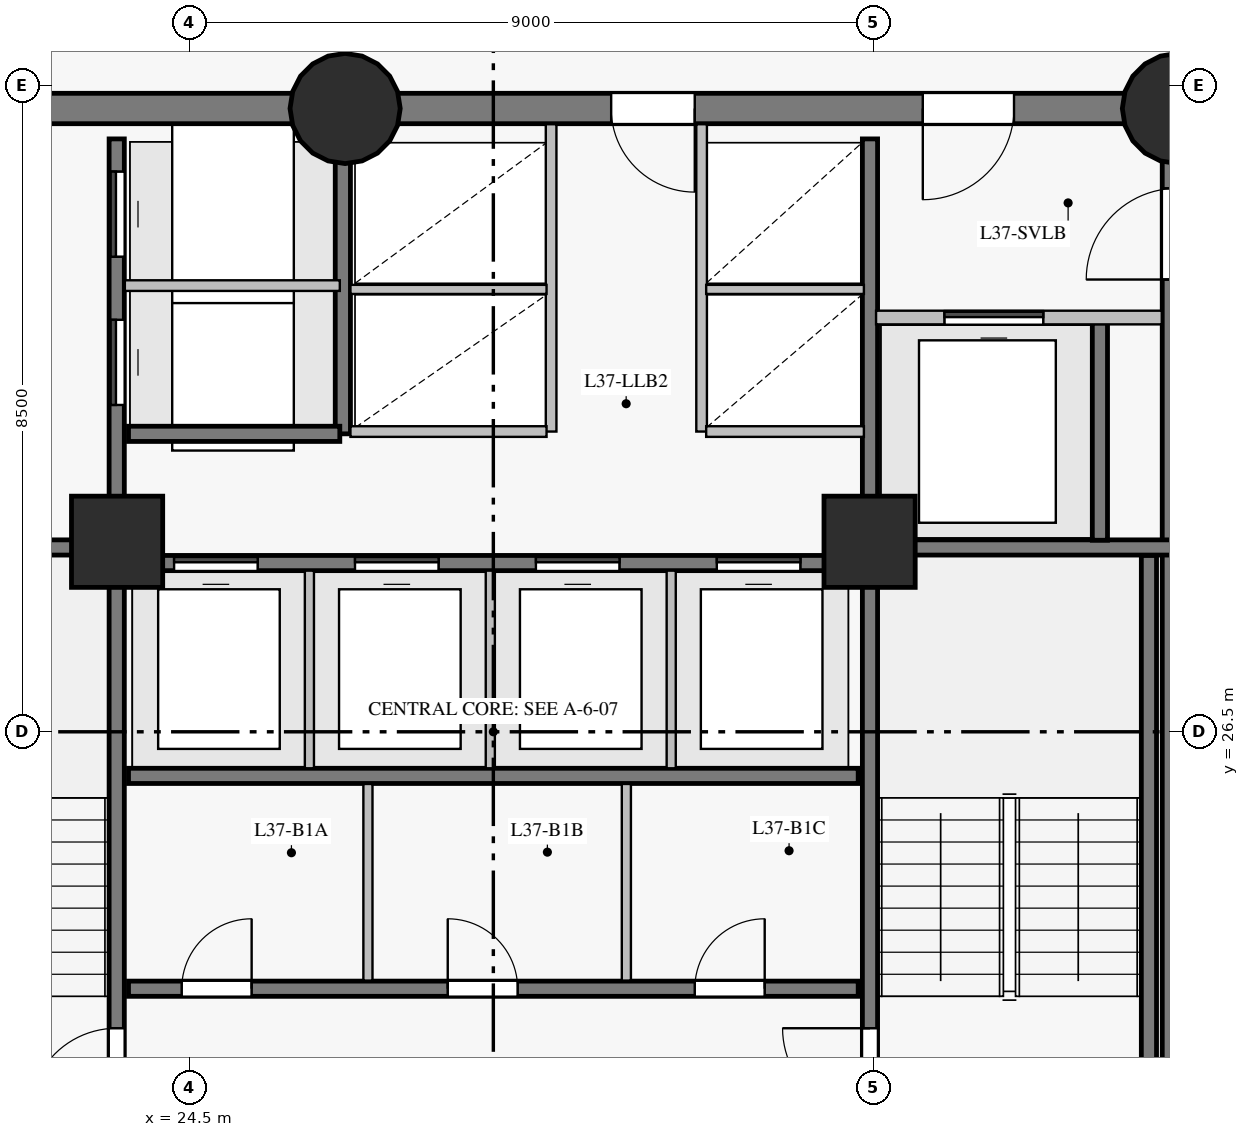
"""IFC4 building model, lengths in metres.
Left out: names, types, materials, properties, quantities, classifications, styles, units other than length and angle.
Written with IfcOpenShell. Run it as: python <this file> out.ifc"""

import sys

from ifc_helpers import new_model, si_unit, direction, frame, frame_2d, origin, origin_with_axes, origin_2d, place, context, subcontext, project, spatial, rectangle, circle, extrude, source, transform, mapped, element, fill, save


model = new_model("IFC4")
c1 = context("Model", 3, precision=1e-05, world=origin(), true_north=direction((0.0, 1.0)))
c2 = subcontext(c1, "Body", "Model", "MODEL_VIEW")
j1 = project(units=[si_unit("LENGTHUNIT", "METRE"), si_unit("PLANEANGLEUNIT", "RADIAN")], contexts=[c1])
p1 = place(None, origin())
s1 = spatial("IfcSite", under=j1, at=p1, CompositionType="ELEMENT")
p2 = place(p1, origin())
s2 = spatial("IfcBuilding", under=s1, at=p2, CompositionType="ELEMENT")
p3 = place(p2, frame((0.0, 0.0, 132.8)))
s3 = spatial("IfcBuildingStorey", under=s2, at=p3, CompositionType="ELEMENT", Elevation=132.8)
p4 = place(p3, frame((37.5, 18.3, 0.0), z_axis=(0.0, 0.0, 1.0), x_axis=(0.0, 1.0, 0.0)))
e1 = element("IfcWall", 1, at=p4, inside=s3, PredefinedType="SHEAR", context=c2, shape_type="SweptSolid", body=[
    extrude(rectangle(XDim=16.4, YDim=0.4, at=frame_2d((8.2, 0.0))), origin(), (0.0, 0.0, 1.0), 2.825),
])
p5 = place(p4, frame((14.15, 0.0, 0.0)))
e2 = element("IfcOpeningElement", 2, at=p5, cuts=e1, PredefinedType="OPENING", context=c2, shape_type="SweptSolid", body=[
    extrude(rectangle(XDim=1.2, YDim=2.15, at=frame_2d((0.6, 1.075))), frame((0.0, 0.21, 0.0), z_axis=(0.0, -1.0, 0.0), x_axis=(1.0, 0.0, 0.0)), (0.0, 0.0, 1.0), 0.42),
])
p6 = place(p3, frame((37.5, 34.7, 0.0), z_axis=(0.0, 0.0, 1.0), x_axis=(-1.0, 0.0, 0.0)))
e3 = element("IfcWall", 3, at=p6, inside=s3, PredefinedType="SHEAR", context=c2, shape_type="SweptSolid", body=[
    extrude(rectangle(XDim=10.95, YDim=0.4, at=frame_2d((5.475, 0.0))), origin(), (0.0, 0.0, 1.0), 2.825),
])
p7 = place(p6, frame((2.15, 0.0, 0.0)))
e4 = element("IfcOpeningElement", 4, at=p7, cuts=e3, PredefinedType="OPENING", context=c2, shape_type="SweptSolid", body=[
    extrude(rectangle(XDim=1.2, YDim=2.15, at=frame_2d((0.6, 1.075))), frame((0.0, 0.21, 0.0), z_axis=(0.0, -1.0, 0.0), x_axis=(1.0, 0.0, 0.0)), (0.0, 0.0, 1.0), 0.42),
])
p8 = place(p6, frame((6.35, 0.0, 0.0)))
e5 = element("IfcOpeningElement", 5, at=p8, cuts=e3, PredefinedType="OPENING", context=c2, shape_type="SweptSolid", body=[
    extrude(rectangle(XDim=1.1, YDim=2.15, at=frame_2d((0.55, 1.075))), frame((0.0, 0.21, 0.0), z_axis=(0.0, -1.0, 0.0), x_axis=(1.0, 0.0, 0.0)), (0.0, 0.0, 1.0), 0.42),
])
p9 = place(p3, frame((26.55, 34.7, 0.0), z_axis=(0.0, 0.0, 1.0), x_axis=(-1.0, 0.0, 0.0)))
e6 = element("IfcWall", 6, at=p9, inside=s3, PredefinedType="SHEAR", context=c2, shape_type="SweptSolid", body=[
    extrude(rectangle(XDim=7.05, YDim=0.4, at=frame_2d((3.525, 0.0))), origin(), (0.0, 0.0, 1.0), 2.825),
])
p10 = place(p9, frame((4.25, 0.0, 0.0)))
e7 = element("IfcOpeningElement", 7, at=p10, cuts=e6, PredefinedType="OPENING", context=c2, shape_type="SweptSolid", body=[
    extrude(rectangle(XDim=1.1, YDim=2.15, at=frame_2d((0.55, 1.075))), frame((0.0, 0.21, 0.0), z_axis=(0.0, -1.0, 0.0), x_axis=(1.0, 0.0, 0.0)), (0.0, 0.0, 1.0), 0.42),
])
m1 = source(origin_with_axes(), c2, "Body", "SweptSolid", [
    extrude(circle(Radius=0.725, at=origin_2d()), origin(), (0.0, 0.0, 1.0), 3.05),
])
for number, where, z_axis, x_axis in (
    (8, (26.55, 34.7, 0.0), (0.0, 0.0, 1.0), (1.0, 0.0, 0.0)),
    (9, (37.5, 34.7, 0.0), (0.0, 0.0, 1.0), (1.0, 0.0, 0.0)),
):
    element("IfcColumn", number, at=place(p3, frame(where, z_axis=z_axis, x_axis=x_axis)), inside=s3, PredefinedType="COLUMN", context=c2, shape_type="MappedRepresentation", body=[
        mapped(m1, transform((0.0, 0.0, 0.0), scale=1.0)),
    ])
m2 = source(origin_with_axes(), c2, "Body", "SweptSolid", [
    extrude(rectangle(XDim=1.2, YDim=1.2, at=origin_2d()), origin(), (0.0, 0.0, 1.0), 3.05),
])
for number, where, z_axis, x_axis in (
    (10, (23.55, 29.0, 0.0), (0.0, 0.0, 1.0), (1.0, 0.0, 0.0)),
    (11, (33.45, 29.0, 0.0), (0.0, 0.0, 1.0), (1.0, 0.0, 0.0)),
):
    element("IfcColumn", number, at=place(p3, frame(where, z_axis=z_axis, x_axis=x_axis)), inside=s3, PredefinedType="COLUMN", context=c2, shape_type="MappedRepresentation", body=[
        mapped(m2, transform((0.0, 0.0, 0.0), scale=1.0)),
    ])
p11 = place(p3, frame((23.545, 18.7, 0.0), z_axis=(0.0, 0.0, 1.0), x_axis=(0.0, 1.0, 0.0)))
e12 = element("IfcWall", 12, at=p11, inside=s3, PredefinedType="SHEAR", context=c2, shape_type="SweptSolid", body=[
    extrude(rectangle(XDim=15.6, YDim=0.2, at=frame_2d((7.8, 0.0))), origin(), (0.0, 0.0, 1.0), 2.825),
])
p12 = place(p11, frame((2.75, 0.0, 0.0)))
e13 = element("IfcOpeningElement", 13, at=p12, cuts=e12, PredefinedType="OPENING", context=c2, shape_type="SweptSolid", body=[
    extrude(rectangle(XDim=1.15, YDim=2.15, at=frame_2d((0.575, 1.075))), frame((0.0, 0.11, 0.0), z_axis=(0.0, -1.0, 0.0), x_axis=(1.0, 0.0, 0.0)), (0.0, 0.0, 1.0), 0.22),
])
p13 = place(p11, frame((0.14, 0.0, 0.0)))
e14 = element("IfcOpeningElement", 14, at=p13, cuts=e12, PredefinedType="OPENING", context=c2, shape_type="SweptSolid", body=[
    extrude(rectangle(XDim=0.88, YDim=2.1, at=frame_2d((0.44, 1.05))), frame((0.0, 0.11, 0.0), z_axis=(0.0, -1.0, 0.0), x_axis=(1.0, 0.0, 0.0)), (0.0, 0.0, 1.0), 0.22),
])
p14 = place(p11, frame((1.36, 0.0, 0.0)))
e15 = element("IfcOpeningElement", 15, at=p14, cuts=e12, PredefinedType="OPENING", context=c2, shape_type="SweptSolid", body=[
    extrude(rectangle(XDim=0.88, YDim=2.1, at=frame_2d((0.44, 1.05))), frame((0.0, 0.11, 0.0), z_axis=(0.0, -1.0, 0.0), x_axis=(1.0, 0.0, 0.0)), (0.0, 0.0, 1.0), 0.22),
])
p15 = place(p11, frame((12.1, 0.0, 0.0)))
e16 = element("IfcOpeningElement", 16, at=p15, cuts=e12, PredefinedType="OPENING", context=c2, shape_type="SweptSolid", body=[
    extrude(rectangle(XDim=1.12, YDim=2.15, at=frame_2d((0.56, 1.075))), frame((0.0, 0.11, 0.0), z_axis=(0.0, -1.0, 0.0), x_axis=(1.0, 0.0, 0.0)), (0.0, 0.0, 1.0), 0.22),
])
p16 = place(p11, frame((14.05, 0.0, 0.0)))
e17 = element("IfcOpeningElement", 17, at=p16, cuts=e12, PredefinedType="OPENING", context=c2, shape_type="SweptSolid", body=[
    extrude(rectangle(XDim=1.12, YDim=2.15, at=frame_2d((0.56, 1.075))), frame((0.0, 0.11, 0.0), z_axis=(0.0, -1.0, 0.0), x_axis=(1.0, 0.0, 0.0)), (0.0, 0.0, 1.0), 0.22),
])
p17 = place(p3, frame((33.455, 18.7, 0.0), z_axis=(0.0, 0.0, 1.0), x_axis=(0.0, 1.0, 0.0)))
e18 = element("IfcWall", 18, at=p17, inside=s3, PredefinedType="SHEAR", context=c2, shape_type="SweptSolid", body=[
    extrude(rectangle(XDim=15.6, YDim=0.2, at=frame_2d((7.8, 0.0))), origin(), (0.0, 0.0, 1.0), 2.825),
])
p18 = place(p17, frame((2.75, 0.0, 0.0)))
e19 = element("IfcOpeningElement", 19, at=p18, cuts=e18, PredefinedType="OPENING", context=c2, shape_type="SweptSolid", body=[
    extrude(rectangle(XDim=1.15, YDim=2.15, at=frame_2d((0.575, 1.075))), frame((0.0, 0.11, 0.0), z_axis=(0.0, -1.0, 0.0), x_axis=(1.0, 0.0, 0.0)), (0.0, 0.0, 1.0), 0.22),
])
p19 = place(p17, frame((0.55, 0.0, 0.0)))
e20 = element("IfcOpeningElement", 20, at=p19, cuts=e18, PredefinedType="OPENING", context=c2, shape_type="SweptSolid", body=[
    extrude(rectangle(XDim=0.94, YDim=2.1, at=frame_2d((0.47, 1.05))), frame((0.0, 0.11, 0.0), z_axis=(0.0, -1.0, 0.0), x_axis=(1.0, 0.0, 0.0)), (0.0, 0.0, 1.0), 0.22),
])
p20 = place(p3, frame((23.7, 23.12, 0.0), z_axis=(0.0, 0.0, 1.0), x_axis=(1.0, 0.0, 0.0)))
e21 = element("IfcWall", 21, at=p20, inside=s3, PredefinedType="SHEAR", context=c2, shape_type="SweptSolid", body=[
    extrude(rectangle(XDim=9.6, YDim=0.2, at=frame_2d((4.8, 0.0))), origin(), (0.0, 0.0, 1.0), 2.825),
])
p21 = place(p20, frame((0.7, 0.0, 0.0)))
e22 = element("IfcOpeningElement", 22, at=p21, cuts=e21, PredefinedType="OPENING", context=c2, shape_type="SweptSolid", body=[
    extrude(rectangle(XDim=0.92, YDim=2.1, at=frame_2d((0.46, 1.05))), frame((0.0, 0.11, 0.0), z_axis=(0.0, -1.0, 0.0), x_axis=(1.0, 0.0, 0.0)), (0.0, 0.0, 1.0), 0.22),
])
p22 = place(p20, frame((4.2, 0.0, 0.0)))
e23 = element("IfcOpeningElement", 23, at=p22, cuts=e21, PredefinedType="OPENING", context=c2, shape_type="SweptSolid", body=[
    extrude(rectangle(XDim=0.92, YDim=2.1, at=frame_2d((0.46, 1.05))), frame((0.0, 0.11, 0.0), z_axis=(0.0, -1.0, 0.0), x_axis=(1.0, 0.0, 0.0)), (0.0, 0.0, 1.0), 0.22),
])
p23 = place(p20, frame((7.45, 0.0, 0.0)))
e24 = element("IfcOpeningElement", 24, at=p23, cuts=e21, PredefinedType="OPENING", context=c2, shape_type="SweptSolid", body=[
    extrude(rectangle(XDim=0.92, YDim=2.1, at=frame_2d((0.46, 1.05))), frame((0.0, 0.11, 0.0), z_axis=(0.0, -1.0, 0.0), x_axis=(1.0, 0.0, 0.0)), (0.0, 0.0, 1.0), 0.22),
])
p24 = place(p3, frame((23.7, 25.92, 0.0), z_axis=(0.0, 0.0, 1.0), x_axis=(1.0, 0.0, 0.0)))
e25 = element("IfcWall", 25, at=p24, inside=s3, PredefinedType="SHEAR", context=c2, shape_type="SweptSolid", body=[
    extrude(rectangle(XDim=9.6, YDim=0.2, at=frame_2d((4.8, 0.0))), origin(), (0.0, 0.0, 1.0), 2.825),
])
p25 = place(p3, frame((23.7, 28.72, 0.0), z_axis=(0.0, 0.0, 1.0), x_axis=(1.0, 0.0, 0.0)))
e26 = element("IfcWall", 26, at=p25, inside=s3, PredefinedType="SHEAR", context=c2, shape_type="SweptSolid", body=[
    extrude(rectangle(XDim=9.6, YDim=0.2, at=frame_2d((4.8, 0.0))), origin(), (0.0, 0.0, 1.0), 2.825),
])
p26 = place(p25, frame((0.6, 0.0, 0.0)))
e27 = element("IfcOpeningElement", 27, at=p26, cuts=e26, PredefinedType="OPENING", context=c2, shape_type="SweptSolid", body=[
    extrude(rectangle(XDim=1.1, YDim=2.15, at=frame_2d((0.55, 1.075))), frame((0.0, 0.11, 0.0), z_axis=(0.0, -1.0, 0.0), x_axis=(1.0, 0.0, 0.0)), (0.0, 0.0, 1.0), 0.22),
])
p27 = place(p25, frame((2.98, 0.0, 0.0)))
e28 = element("IfcOpeningElement", 28, at=p27, cuts=e26, PredefinedType="OPENING", context=c2, shape_type="SweptSolid", body=[
    extrude(rectangle(XDim=1.1, YDim=2.15, at=frame_2d((0.55, 1.075))), frame((0.0, 0.11, 0.0), z_axis=(0.0, -1.0, 0.0), x_axis=(1.0, 0.0, 0.0)), (0.0, 0.0, 1.0), 0.22),
])
p28 = place(p25, frame((5.36, 0.0, 0.0)))
e29 = element("IfcOpeningElement", 29, at=p28, cuts=e26, PredefinedType="OPENING", context=c2, shape_type="SweptSolid", body=[
    extrude(rectangle(XDim=1.1, YDim=2.15, at=frame_2d((0.55, 1.075))), frame((0.0, 0.11, 0.0), z_axis=(0.0, -1.0, 0.0), x_axis=(1.0, 0.0, 0.0)), (0.0, 0.0, 1.0), 0.22),
])
p29 = place(p25, frame((7.74, 0.0, 0.0)))
e30 = element("IfcOpeningElement", 30, at=p29, cuts=e26, PredefinedType="OPENING", context=c2, shape_type="SweptSolid", body=[
    extrude(rectangle(XDim=1.1, YDim=2.15, at=frame_2d((0.55, 1.075))), frame((0.0, 0.11, 0.0), z_axis=(0.0, -1.0, 0.0), x_axis=(1.0, 0.0, 0.0)), (0.0, 0.0, 1.0), 0.22),
])
p30 = place(p3, frame((37.125, 21.32, 0.0), z_axis=(0.0, 0.0, 1.0), x_axis=(0.0, 1.0, 0.0)))
e31 = element("IfcWall", 31, at=p30, inside=s3, PredefinedType="SHEAR", context=c2, shape_type="SweptSolid", body=[
    extrude(rectangle(XDim=7.5, YDim=0.2, at=frame_2d((3.75, 0.0))), origin(), (0.0, 0.0, 1.0), 2.825),
])
for number, where, z_axis, x_axis in (
    (32, (33.455, 28.925, 0.0), (0.0, 0.0, 1.0), (1.0, 0.0, 0.0)),
    (33, (19.55, 28.925, 0.0), (0.0, 0.0, 1.0), (1.0, 0.0, 0.0)),
):
    element("IfcWall", number, at=place(p3, frame(where, z_axis=z_axis, x_axis=x_axis)), inside=s3, PredefinedType="SHEAR", context=c2, shape_type="SweptSolid", body=[
        extrude(rectangle(XDim=3.995, YDim=0.2, at=frame_2d((1.998, 0.0))), origin(), (0.0, 0.0, 1.0), 2.825),
    ])
p31 = place(p3, frame((26.52, 30.42, 0.0), z_axis=(0.0, 0.0, 1.0), x_axis=(0.0, 1.0, 0.0)))
e34 = element("IfcWall", 34, at=p31, inside=s3, PredefinedType="SHEAR", context=c2, shape_type="SweptSolid", body=[
    extrude(rectangle(XDim=3.86, YDim=0.2, at=frame_2d((1.93, 0.0))), origin(), (0.0, 0.0, 1.0), 2.825),
])
p32 = place(p3, frame((36.48, 29.02, 0.0), z_axis=(0.0, 0.0, 1.0), x_axis=(0.0, 1.0, 0.0)))
e35 = element("IfcWall", 35, at=p32, inside=s3, PredefinedType="SHEAR", context=c2, shape_type="SweptSolid", body=[
    extrude(rectangle(XDim=2.86, YDim=0.2, at=frame_2d((1.43, 0.0))), origin(), (0.0, 0.0, 1.0), 2.825),
])
p33 = place(p3, frame((23.7, 30.42, 0.0), z_axis=(0.0, 0.0, 1.0), x_axis=(1.0, 0.0, 0.0)))
e36 = element("IfcWall", 36, at=p33, inside=s3, PredefinedType="SHEAR", context=c2, shape_type="SweptSolid", body=[
    extrude(rectangle(XDim=2.78, YDim=0.2, at=frame_2d((1.39, 0.0))), origin(), (0.0, 0.0, 1.0), 2.825),
])
for number, where, z_axis, x_axis in (
    (37, (29.26, 30.45, 0.0), (0.0, 0.0, 1.0), (0.0, 1.0, 0.0)),
    (38, (31.24, 30.45, 0.0), (0.0, 0.0, 1.0), (0.0, 1.0, 0.0)),
):
    element("IfcWall", number, at=place(p3, frame(where, z_axis=z_axis, x_axis=x_axis)), inside=s3, PredefinedType="PARTITIONING", context=c2, shape_type="SweptSolid", body=[
        extrude(rectangle(XDim=4.043, YDim=0.14, at=frame_2d((2.021, 0.0))), origin(), (0.0, 0.0, 1.0), 2.825),
    ])
p34 = place(p3, frame((33.535, 31.95, 0.0), z_axis=(0.0, 0.0, 1.0), x_axis=(1.0, 0.0, 0.0)))
e39 = element("IfcWall", 39, at=p34, inside=s3, PredefinedType="PARTITIONING", context=c2, shape_type="SweptSolid", body=[
    extrude(rectangle(XDim=3.759, YDim=0.18, at=frame_2d((1.879, 0.0))), origin(), (0.0, 0.0, 1.0), 2.825),
])
p35 = place(p34, frame((0.9, 0.0, 0.0)))
e40 = element("IfcOpeningElement", 40, at=p35, cuts=e39, PredefinedType="OPENING", context=c2, shape_type="SweptSolid", body=[
    extrude(rectangle(XDim=1.3, YDim=2.2, at=frame_2d((0.65, 1.1))), frame((0.0, 0.1, 0.0), z_axis=(0.0, -1.0, 0.0), x_axis=(1.0, 0.0, 0.0)), (0.0, 0.0, 1.0), 0.2),
])
p36 = place(p3, frame((23.652, 32.37, 0.0), z_axis=(0.0, 0.0, 1.0), x_axis=(1.0, 0.0, 0.0)))
e41 = element("IfcWall", 41, at=p36, inside=s3, PredefinedType="PARTITIONING", context=c2, shape_type="SweptSolid", body=[
    extrude(rectangle(XDim=2.828, YDim=0.14, at=frame_2d((1.414, 0.0))), origin(), (0.0, 0.0, 1.0), 2.825),
])
for number, where, z_axis, x_axis in (
    (42, (26.08, 26.02, 0.0), (0.0, 0.0, 1.0), (0.0, 1.0, 0.0)),
    (43, (28.46, 26.02, 0.0), (0.0, 0.0, 1.0), (0.0, 1.0, 0.0)),
    (44, (30.84, 26.02, 0.0), (0.0, 0.0, 1.0), (0.0, 1.0, 0.0)),
):
    element("IfcWall", number, at=place(p3, frame(where, z_axis=z_axis, x_axis=x_axis)), inside=s3, PredefinedType="PARTITIONING", context=c2, shape_type="SweptSolid", body=[
        extrude(rectangle(XDim=2.6, YDim=0.12, at=frame_2d((1.3, 0.0))), origin(), (0.0, 0.0, 1.0), 2.825),
    ])
p37 = place(p3, frame((26.62, 30.45, 0.0), z_axis=(0.0, 0.0, 1.0), x_axis=(1.0, 0.0, 0.0)))
e45 = element("IfcWall", 45, at=p37, inside=s3, PredefinedType="PARTITIONING", context=c2, shape_type="SweptSolid", body=[
    extrude(rectangle(XDim=2.58, YDim=0.14, at=frame_2d((1.29, 0.0))), origin(), (0.0, 0.0, 1.0), 2.825),
])
p38 = place(p3, frame((26.62, 32.32, 0.0), z_axis=(0.0, 0.0, 1.0), x_axis=(1.0, 0.0, 0.0)))
e46 = element("IfcWall", 46, at=p38, inside=s3, PredefinedType="PARTITIONING", context=c2, shape_type="SweptSolid", body=[
    extrude(rectangle(XDim=2.58, YDim=0.12, at=frame_2d((1.29, 0.0))), origin(), (0.0, 0.0, 1.0), 2.825),
])
for number, where, z_axis, x_axis in (
    (47, (26.85, 23.227, 0.0), (0.0, 0.0, 1.0), (0.0, 1.0, 0.0)),
    (48, (30.25, 23.227, 0.0), (0.0, 0.0, 1.0), (0.0, 1.0, 0.0)),
):
    element("IfcWall", number, at=place(p3, frame(where, z_axis=z_axis, x_axis=x_axis)), inside=s3, PredefinedType="PARTITIONING", context=c2, shape_type="SweptSolid", body=[
        extrude(rectangle(XDim=2.587, YDim=0.12, at=frame_2d((1.293, 0.0))), origin(), (0.0, 0.0, 1.0), 2.825),
    ])
p39 = place(p3, frame((31.3, 30.45, 0.0), z_axis=(0.0, 0.0, 1.0), x_axis=(1.0, 0.0, 0.0)))
e49 = element("IfcWall", 49, at=p39, inside=s3, PredefinedType="PARTITIONING", context=c2, shape_type="SweptSolid", body=[
    extrude(rectangle(XDim=2.075, YDim=0.14, at=frame_2d((1.038, 0.0))), origin(), (0.0, 0.0, 1.0), 2.825),
])
p40 = place(p3, frame((31.3, 32.32, 0.0), z_axis=(0.0, 0.0, 1.0), x_axis=(1.0, 0.0, 0.0)))
e50 = element("IfcWall", 50, at=p40, inside=s3, PredefinedType="PARTITIONING", context=c2, shape_type="SweptSolid", body=[
    extrude(rectangle(XDim=2.075, YDim=0.12, at=frame_2d((1.038, 0.0))), origin(), (0.0, 0.0, 1.0), 2.825),
])
m3 = source(origin_with_axes(), c2, "Body", "SweptSolid", [
    extrude(rectangle(XDim=1.15, YDim=2.15, at=frame_2d((0.575, 1.075))), frame((0.0, 0.025, 0.0), z_axis=(0.0, -1.0, 0.0), x_axis=(1.0, 0.0, 0.0)), (0.0, 0.0, 1.0), 0.05),
])
p41 = place(p12, origin())
e51 = element("IfcDoor", 51, at=p41, inside=s3, OperationType="SINGLE_SWING_LEFT", PredefinedType="DOOR", context=c2, shape_type="MappedRepresentation", body=[
    mapped(m3, transform((0.0, 0.0, 0.0), scale=1.0)),
])
fill(e13, e51)
p42 = place(p18, origin())
e52 = element("IfcDoor", 52, at=p42, inside=s3, OperationType="SINGLE_SWING_RIGHT", PredefinedType="DOOR", context=c2, shape_type="MappedRepresentation", body=[
    mapped(m3, transform((0.0, 0.0, 0.0), scale=1.0)),
])
fill(e19, e52)
m4 = source(origin_with_axes(), c2, "Body", "SweptSolid", [
    extrude(rectangle(XDim=1.2, YDim=2.15, at=frame_2d((0.6, 1.075))), frame((0.0, 0.025, 0.0), z_axis=(0.0, -1.0, 0.0), x_axis=(1.0, 0.0, 0.0)), (0.0, 0.0, 1.0), 0.05),
])
p43 = place(p7, origin())
e53 = element("IfcDoor", 53, at=p43, inside=s3, OperationType="SINGLE_SWING_RIGHT", PredefinedType="DOOR", context=c2, shape_type="MappedRepresentation", body=[
    mapped(m4, transform((0.0, 0.0, 0.0), scale=1.0)),
])
fill(e4, e53)
m5 = source(origin_with_axes(), c2, "Body", "SweptSolid", [
    extrude(rectangle(XDim=1.3, YDim=2.2, at=frame_2d((0.65, 1.1))), frame((0.0, 0.025, 0.0), z_axis=(0.0, -1.0, 0.0), x_axis=(1.0, 0.0, 0.0)), (0.0, 0.0, 1.0), 0.05),
])
p44 = place(p35, origin())
e54 = element("IfcDoor", 54, at=p44, inside=s3, OperationType="SLIDING_TO_LEFT", PredefinedType="DOOR", context=c2, shape_type="MappedRepresentation", body=[
    mapped(m5, transform((0.0, 0.0, 0.0), scale=1.0)),
])
fill(e40, e54)
m6 = source(origin_with_axes(), c2, "Body", "SweptSolid", [
    extrude(rectangle(XDim=0.92, YDim=2.1, at=frame_2d((0.46, 1.05))), frame((0.0, 0.025, 0.0), z_axis=(0.0, -1.0, 0.0), x_axis=(1.0, 0.0, 0.0)), (0.0, 0.0, 1.0), 0.05),
])
p45 = place(p21, origin())
e55 = element("IfcDoor", 55, at=p45, inside=s3, OperationType="SINGLE_SWING_RIGHT", PredefinedType="DOOR", context=c2, shape_type="MappedRepresentation", body=[
    mapped(m6, transform((0.0, 0.0, 0.0), scale=1.0)),
])
fill(e22, e55)
p46 = place(p22, origin())
e56 = element("IfcDoor", 56, at=p46, inside=s3, OperationType="SINGLE_SWING_LEFT", PredefinedType="DOOR", context=c2, shape_type="MappedRepresentation", body=[
    mapped(m6, transform((0.0, 0.0, 0.0), scale=1.0)),
])
fill(e23, e56)
p47 = place(p23, origin())
e57 = element("IfcDoor", 57, at=p47, inside=s3, OperationType="SINGLE_SWING_RIGHT", PredefinedType="DOOR", context=c2, shape_type="MappedRepresentation", body=[
    mapped(m6, transform((0.0, 0.0, 0.0), scale=1.0)),
])
fill(e24, e57)
m7 = source(origin_with_axes(), c2, "Body", "SweptSolid", [
    extrude(rectangle(XDim=1.1, YDim=2.15, at=frame_2d((0.55, 1.075))), frame((0.0, 0.025, 0.0), z_axis=(0.0, -1.0, 0.0), x_axis=(1.0, 0.0, 0.0)), (0.0, 0.0, 1.0), 0.05),
])
p48 = place(p26, origin())
e58 = element("IfcDoor", 58, at=p48, inside=s3, OperationType="SLIDING_TO_LEFT", PredefinedType="DOOR", context=c2, shape_type="MappedRepresentation", body=[
    mapped(m7, transform((0.0, 0.0, 0.0), scale=1.0)),
])
fill(e27, e58)
p49 = place(p27, origin())
e59 = element("IfcDoor", 59, at=p49, inside=s3, OperationType="SLIDING_TO_RIGHT", PredefinedType="DOOR", context=c2, shape_type="MappedRepresentation", body=[
    mapped(m7, transform((0.0, 0.0, 0.0), scale=1.0)),
])
fill(e28, e59)
p50 = place(p28, origin())
e60 = element("IfcDoor", 60, at=p50, inside=s3, OperationType="SLIDING_TO_LEFT", PredefinedType="DOOR", context=c2, shape_type="MappedRepresentation", body=[
    mapped(m7, transform((0.0, 0.0, 0.0), scale=1.0)),
])
fill(e29, e60)
p51 = place(p29, origin())
e61 = element("IfcDoor", 61, at=p51, inside=s3, OperationType="SLIDING_TO_RIGHT", PredefinedType="DOOR", context=c2, shape_type="MappedRepresentation", body=[
    mapped(m7, transform((0.0, 0.0, 0.0), scale=1.0)),
])
fill(e30, e61)
p52 = place(p8, origin())
e62 = element("IfcDoor", 62, at=p52, inside=s3, OperationType="SINGLE_SWING_LEFT", PredefinedType="DOOR", context=c2, shape_type="MappedRepresentation", body=[
    mapped(m7, transform((0.0, 0.0, 0.0), scale=1.0)),
])
fill(e5, e62)
m8 = source(origin_with_axes(), c2, "Body", "SweptSolid", [
    extrude(rectangle(XDim=1.12, YDim=2.15, at=frame_2d((0.56, 1.075))), frame((0.0, 0.025, 0.0), z_axis=(0.0, -1.0, 0.0), x_axis=(1.0, 0.0, 0.0)), (0.0, 0.0, 1.0), 0.05),
])
p53 = place(p15, origin())
e63 = element("IfcDoor", 63, at=p53, inside=s3, OperationType="SLIDING_TO_LEFT", PredefinedType="DOOR", context=c2, shape_type="MappedRepresentation", body=[
    mapped(m8, transform((0.0, 0.0, 0.0), scale=1.0)),
])
fill(e16, e63)
p54 = place(p16, origin())
e64 = element("IfcDoor", 64, at=p54, inside=s3, OperationType="SLIDING_TO_RIGHT", PredefinedType="DOOR", context=c2, shape_type="MappedRepresentation", body=[
    mapped(m8, transform((0.0, 0.0, 0.0), scale=1.0)),
])
fill(e17, e64)
save(model, sys.argv[1])
